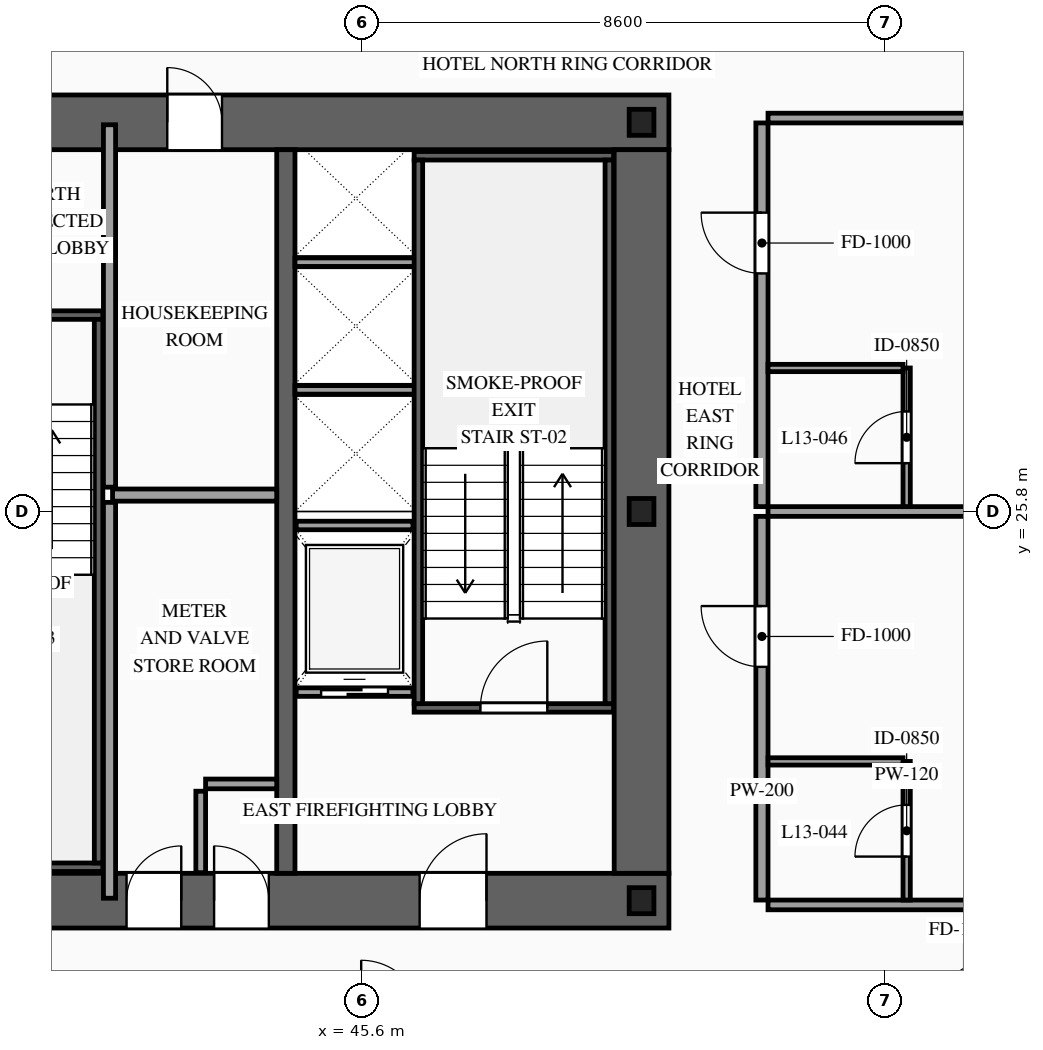
"""IFC4 building model, lengths in metres.
Left out: names, types, materials, properties, quantities, classifications, styles, units other than length and angle.
Written with IfcOpenShell. Run it as: python <this file> out.ifc"""

import sys

from ifc_helpers import new_model, si_unit, direction, frame, frame_2d, origin, origin_2d, place, context, subcontext, project, spatial, rectangle, i_section, extrude, source, transform, mapped, element, fill, save


model = new_model("IFC4")
c1 = context("Model", 3, precision=1e-05, world=origin(), true_north=direction((0.0, 1.0)))
c2 = subcontext(c1, "Body", "Model", "MODEL_VIEW")
j1 = project(units=[si_unit("LENGTHUNIT", "METRE"), si_unit("PLANEANGLEUNIT", "RADIAN")], contexts=[c1])
p1 = place(None, origin())
s1 = spatial("IfcSite", under=j1, at=p1, CompositionType="ELEMENT")
p2 = place(p1, origin())
s2 = spatial("IfcBuilding", under=s1, at=p2, CompositionType="ELEMENT")
p3 = place(p2, frame((0.0, 0.0, 53.2)))
s3 = spatial("IfcBuildingStorey", under=s2, at=p3, CompositionType="ELEMENT", Elevation=53.2)
p4 = place(p3, frame((23.35, 19.4, 0.0), z_axis=(0.0, 0.0, 1.0), x_axis=(1.0, 0.0, 0.0)))
e1 = element("IfcWall", 1, at=p4, inside=s3, PredefinedType="SHEAR", context=c2, shape_type="SweptSolid", body=[
    extrude(rectangle(XDim=27.3, YDim=0.9, at=frame_2d((13.65, 0.0))), origin(), (0.0, 0.0, 1.0), 3.6),
])
p5 = place(p4, frame((2.1, 0.0, 0.0)))
e2 = element("IfcOpeningElement", 2, at=p5, cuts=e1, PredefinedType="OPENING", context=c2, shape_type="SweptSolid", body=[
    extrude(rectangle(XDim=1.1, YDim=2.2, at=frame_2d((0.55, 1.1))), frame((0.0, 0.465, 0.0), z_axis=(0.0, -1.0, 0.0), x_axis=(1.0, 0.0, 0.0)), (0.0, 0.0, 1.0), 0.93),
])
p6 = place(p4, frame((10.0, 0.0, 0.0)))
e3 = element("IfcOpeningElement", 3, at=p6, cuts=e1, PredefinedType="OPENING", context=c2, shape_type="SweptSolid", body=[
    extrude(rectangle(XDim=1.1, YDim=2.2, at=frame_2d((0.55, 1.1))), frame((0.0, 0.465, 0.0), z_axis=(0.0, -1.0, 0.0), x_axis=(1.0, 0.0, 0.0)), (0.0, 0.0, 1.0), 0.93),
])
p7 = place(p4, frame((23.2, 0.0, 0.0)))
e4 = element("IfcOpeningElement", 4, at=p7, cuts=e1, PredefinedType="OPENING", context=c2, shape_type="SweptSolid", body=[
    extrude(rectangle(XDim=1.1, YDim=2.2, at=frame_2d((0.55, 1.1))), frame((0.0, 0.465, 0.0), z_axis=(0.0, -1.0, 0.0), x_axis=(1.0, 0.0, 0.0)), (0.0, 0.0, 1.0), 0.93),
])
p8 = place(p4, frame((19.82, 0.0, 0.0)))
e5 = element("IfcOpeningElement", 5, at=p8, cuts=e1, PredefinedType="OPENING", context=c2, shape_type="SweptSolid", body=[
    extrude(rectangle(XDim=0.9, YDim=2.15, at=frame_2d((0.45, 1.075))), frame((0.0, 0.465, 0.0), z_axis=(0.0, -1.0, 0.0), x_axis=(1.0, 0.0, 0.0)), (0.0, 0.0, 1.0), 0.93),
])
p9 = place(p4, frame((18.38, 0.0, 0.0)))
e6 = element("IfcOpeningElement", 6, at=p9, cuts=e1, PredefinedType="OPENING", context=c2, shape_type="SweptSolid", body=[
    extrude(rectangle(XDim=0.9, YDim=2.15, at=frame_2d((0.45, 1.075))), frame((0.0, 0.465, 0.0), z_axis=(0.0, -1.0, 0.0), x_axis=(1.0, 0.0, 0.0)), (0.0, 0.0, 1.0), 0.93),
])
p10 = place(p3, frame((23.35, 32.2, 0.0), z_axis=(0.0, 0.0, 1.0), x_axis=(1.0, 0.0, 0.0)))
e7 = element("IfcWall", 7, at=p10, inside=s3, PredefinedType="SHEAR", context=c2, shape_type="SweptSolid", body=[
    extrude(rectangle(XDim=27.3, YDim=0.9, at=frame_2d((13.65, 0.0))), origin(), (0.0, 0.0, 1.0), 3.6),
])
p11 = place(p10, frame((4.72, 0.0, 0.0)))
e8 = element("IfcOpeningElement", 8, at=p11, cuts=e7, PredefinedType="OPENING", context=c2, shape_type="SweptSolid", body=[
    extrude(rectangle(XDim=0.9, YDim=2.15, at=frame_2d((0.45, 1.075))), frame((0.0, 0.465, 0.0), z_axis=(0.0, -1.0, 0.0), x_axis=(1.0, 0.0, 0.0)), (0.0, 0.0, 1.0), 0.93),
])
p12 = place(p10, frame((10.0, 0.0, 0.0)))
e9 = element("IfcOpeningElement", 9, at=p12, cuts=e7, PredefinedType="OPENING", context=c2, shape_type="SweptSolid", body=[
    extrude(rectangle(XDim=1.1, YDim=2.2, at=frame_2d((0.55, 1.1))), frame((0.0, 0.465, 0.0), z_axis=(0.0, -1.0, 0.0), x_axis=(1.0, 0.0, 0.0)), (0.0, 0.0, 1.0), 0.93),
])
p13 = place(p10, frame((15.85, 0.0, 0.0)))
e10 = element("IfcOpeningElement", 10, at=p13, cuts=e7, PredefinedType="OPENING", context=c2, shape_type="SweptSolid", body=[
    extrude(rectangle(XDim=1.1, YDim=2.2, at=frame_2d((0.55, 1.1))), frame((0.0, 0.465, 0.0), z_axis=(0.0, -1.0, 0.0), x_axis=(1.0, 0.0, 0.0)), (0.0, 0.0, 1.0), 0.93),
])
p14 = place(p10, frame((19.05, 0.0, 0.0)))
e11 = element("IfcOpeningElement", 11, at=p14, cuts=e7, PredefinedType="OPENING", context=c2, shape_type="SweptSolid", body=[
    extrude(rectangle(XDim=0.9, YDim=2.15, at=frame_2d((0.45, 1.075))), frame((0.0, 0.465, 0.0), z_axis=(0.0, -1.0, 0.0), x_axis=(1.0, 0.0, 0.0)), (0.0, 0.0, 1.0), 0.93),
])
m1 = source(origin(), c2, "Body", "SweptSolid", [
    extrude(rectangle(XDim=11.9, YDim=0.9, at=frame_2d((5.95, 0.0))), origin(), (0.0, 0.0, 1.0), 3.6),
])
p15 = place(p3, frame((50.2, 19.85, 0.0), z_axis=(0.0, 0.0, 1.0), x_axis=(0.0, 1.0, 0.0)))
e12 = element("IfcWall", 12, at=p15, inside=s3, PredefinedType="SHEAR", context=c2, shape_type="MappedRepresentation", body=[
    mapped(m1, transform((0.0, 0.0, 0.0), scale=1.0)),
])
m2 = source(origin(), c2, "Body", "SweptSolid", [
    extrude(rectangle(XDim=11.9, YDim=0.3, at=frame_2d((5.95, 0.0))), origin(), (0.0, 0.0, 1.0), 3.6),
])
p16 = place(p3, frame((44.35, 19.85, 0.0), z_axis=(0.0, 0.0, 1.0), x_axis=(0.0, 1.0, 0.0)))
e13 = element("IfcWall", 13, at=p16, inside=s3, PredefinedType="SOLIDWALL", context=c2, shape_type="MappedRepresentation", body=[
    mapped(m2, transform((0.0, 0.0, 0.0), scale=1.0)),
])
m3 = source(origin(), c2, "Body", "SweptSolid", [
    extrude(i_section(OverallWidth=0.407, OverallDepth=0.428, WebThickness=0.02, FlangeThickness=0.035, at=origin_2d()), origin(), (0.0, 0.0, 1.0), 3.6),
])
for number, where, z_axis, x_axis in (
    (14, (50.2, 19.4, 0.0), (0.0, 0.0, 1.0), (1.0, 0.0, 0.0)),
    (15, (50.2, 25.8, 0.0), (0.0, 0.0, 1.0), (1.0, 0.0, 0.0)),
    (16, (50.2, 32.2, 0.0), (0.0, 0.0, 1.0), (1.0, 0.0, 0.0)),
):
    element("IfcColumn", number, at=place(p3, frame(where, z_axis=z_axis, x_axis=x_axis)), inside=s3, PredefinedType="COLUMN", context=c2, shape_type="MappedRepresentation", body=[
        mapped(m3, transform((0.0, 0.0, 0.0), scale=1.0)),
    ])
p17 = place(p3, frame((44.52, 22.83, 0.0), z_axis=(0.0, 0.0, 1.0), x_axis=(1.0, 0.0, 0.0)))
e17 = element("IfcWall", 17, at=p17, inside=s3, PredefinedType="SOLIDWALL", context=c2, shape_type="SweptSolid", body=[
    extrude(rectangle(XDim=1.92, YDim=0.14, at=frame_2d((0.96, 0.0))), origin(), (0.0, 0.0, 1.0), 3.38),
])
p18 = place(p17, frame((0.41, 0.0, 0.0)))
e18 = element("IfcOpeningElement", 18, at=p18, cuts=e17, PredefinedType="OPENING", context=c2, shape_type="SweptSolid", body=[
    extrude(rectangle(XDim=1.1, YDim=2.2, at=frame_2d((0.55, 1.1))), frame((0.0, 0.085, 0.0), z_axis=(0.0, -1.0, 0.0), x_axis=(1.0, 0.0, 0.0)), (0.0, 0.0, 1.0), 0.17),
])
m4 = source(origin(), c2, "Body", "SweptSolid", [
    extrude(rectangle(XDim=1.92, YDim=0.14, at=frame_2d((0.96, 0.0))), origin(), (0.0, 0.0, 1.0), 3.38),
])
p19 = place(p3, frame((44.52, 25.57, 0.0), z_axis=(0.0, 0.0, 1.0), x_axis=(1.0, 0.0, 0.0)))
e19 = element("IfcWall", 19, at=p19, inside=s3, PredefinedType="SOLIDWALL", context=c2, shape_type="MappedRepresentation", body=[
    mapped(m4, transform((0.0, 0.0, 0.0), scale=1.0)),
])
m5 = source(origin(), c2, "Body", "SweptSolid", [
    extrude(rectangle(XDim=2.0, YDim=0.14, at=frame_2d((1.0, 0.0))), origin(), (0.0, 0.0, 1.0), 3.38),
])
for number, where, z_axis, x_axis in (
    (20, (44.5, 27.8, 0.0), (0.0, 0.0, 1.0), (1.0, 0.0, 0.0)),
    (21, (44.5, 29.9, 0.0), (0.0, 0.0, 1.0), (1.0, 0.0, 0.0)),
):
    element("IfcWall", number, at=place(p3, frame(where, z_axis=z_axis, x_axis=x_axis)), inside=s3, PredefinedType="SOLIDWALL", context=c2, shape_type="MappedRepresentation", body=[
        mapped(m5, transform((0.0, 0.0, 0.0), scale=1.0)),
    ])
p20 = place(p3, frame((46.46, 22.57, 0.0), z_axis=(0.0, 0.0, 1.0), x_axis=(1.0, 0.0, 0.0)))
e22 = element("IfcWall", 22, at=p20, inside=s3, PredefinedType="SOLIDWALL", context=c2, shape_type="SweptSolid", body=[
    extrude(rectangle(XDim=3.28, YDim=0.14, at=frame_2d((1.64, 0.0))), origin(), (0.0, 0.0, 1.0), 3.38),
])
p21 = place(p20, frame((1.09, 0.0, 0.0)))
e23 = element("IfcOpeningElement", 23, at=p21, cuts=e22, PredefinedType="OPENING", context=c2, shape_type="SweptSolid", body=[
    extrude(rectangle(XDim=1.1, YDim=2.2, at=frame_2d((0.55, 1.1))), frame((0.0, 0.085, 0.0), z_axis=(0.0, -1.0, 0.0), x_axis=(1.0, 0.0, 0.0)), (0.0, 0.0, 1.0), 0.17),
])
m6 = source(origin(), c2, "Body", "SweptSolid", [
    extrude(rectangle(XDim=3.28, YDim=0.14, at=frame_2d((1.64, 0.0))), origin(), (0.0, 0.0, 1.0), 3.38),
])
p22 = place(p3, frame((46.46, 31.65, 0.0), z_axis=(0.0, 0.0, 1.0), x_axis=(1.0, 0.0, 0.0)))
e24 = element("IfcWall", 24, at=p22, inside=s3, PredefinedType="SOLIDWALL", context=c2, shape_type="MappedRepresentation", body=[
    mapped(m6, transform((0.0, 0.0, 0.0), scale=1.0)),
])
m7 = source(origin(), c2, "Body", "SweptSolid", [
    extrude(rectangle(XDim=8.94, YDim=0.14, at=frame_2d((4.47, 0.0))), origin(), (0.0, 0.0, 1.0), 3.38),
])
for number, where, z_axis, x_axis in (
    (25, (46.53, 22.64, 0.0), (0.0, 0.0, 1.0), (0.0, 1.0, 0.0)),
    (26, (49.67, 22.64, 0.0), (0.0, 0.0, 1.0), (0.0, 1.0, 0.0)),
):
    element("IfcWall", number, at=place(p3, frame(where, z_axis=z_axis, x_axis=x_axis)), inside=s3, PredefinedType="SOLIDWALL", context=c2, shape_type="MappedRepresentation", body=[
        mapped(m7, transform((0.0, 0.0, 0.0), scale=1.0)),
    ])
p23 = place(p3, frame((38.2, 29.03, 0.0), z_axis=(0.0, 0.0, 1.0), x_axis=(1.0, 0.0, 0.0)))
e27 = element("IfcWall", 27, at=p23, inside=s3, PredefinedType="SOLIDWALL", context=c2, shape_type="SweptSolid", body=[
    extrude(rectangle(XDim=3.14, YDim=0.14, at=frame_2d((1.57, 0.0))), origin(), (0.0, 0.0, 1.0), 3.38),
])
p24 = place(p23, frame((1.02, 0.0, 0.0)))
e28 = element("IfcOpeningElement", 28, at=p24, cuts=e27, PredefinedType="OPENING", context=c2, shape_type="SweptSolid", body=[
    extrude(rectangle(XDim=1.1, YDim=2.2, at=frame_2d((0.55, 1.1))), frame((0.0, 0.085, 0.0), z_axis=(0.0, -1.0, 0.0), x_axis=(1.0, 0.0, 0.0)), (0.0, 0.0, 1.0), 0.17),
])
m8 = source(origin(), c2, "Body", "SweptSolid", [
    extrude(rectangle(XDim=3.14, YDim=0.14, at=frame_2d((1.57, 0.0))), origin(), (0.0, 0.0, 1.0), 3.38),
])
p25 = place(p3, frame((38.2, 19.95, 0.0), z_axis=(0.0, 0.0, 1.0), x_axis=(1.0, 0.0, 0.0)))
e29 = element("IfcWall", 29, at=p25, inside=s3, PredefinedType="SOLIDWALL", context=c2, shape_type="MappedRepresentation", body=[
    mapped(m8, transform((0.0, 0.0, 0.0), scale=1.0)),
])
m9 = source(origin(), c2, "Body", "SweptSolid", [
    extrude(rectangle(XDim=8.94, YDim=0.14, at=frame_2d((4.47, 0.0))), origin(), (0.0, 0.0, 1.0), 3.38),
])
p26 = place(p3, frame((41.27, 20.02, 0.0), z_axis=(0.0, 0.0, 1.0), x_axis=(0.0, 1.0, 0.0)))
e30 = element("IfcWall", 30, at=p26, inside=s3, PredefinedType="SOLIDWALL", context=c2, shape_type="MappedRepresentation", body=[
    mapped(m9, transform((0.0, 0.0, 0.0), scale=1.0)),
])
m10 = source(origin(), c2, "Body", "SweptSolid", [
    extrude(rectangle(XDim=1.34, YDim=0.16, at=frame_2d((0.67, 0.0))), origin(), (0.0, 0.0, 1.0), 3.38),
])
p27 = place(p3, frame((42.95, 19.86, 0.0), z_axis=(0.0, 0.0, 1.0), x_axis=(0.0, 1.0, 0.0)))
e31 = element("IfcWall", 31, at=p27, inside=s3, PredefinedType="PARTITIONING", context=c2, shape_type="MappedRepresentation", body=[
    mapped(m10, transform((0.0, 0.0, 0.0), scale=1.0)),
])
m11 = source(origin(), c2, "Body", "SweptSolid", [
    extrude(rectangle(XDim=1.17, YDim=0.16, at=frame_2d((0.585, 0.0))), origin(), (0.0, 0.0, 1.0), 3.38),
])
p28 = place(p3, frame((43.03, 21.32, 0.0), z_axis=(0.0, 0.0, 1.0), x_axis=(1.0, 0.0, 0.0)))
e32 = element("IfcWall", 32, at=p28, inside=s3, PredefinedType="PARTITIONING", context=c2, shape_type="MappedRepresentation", body=[
    mapped(m11, transform((0.0, 0.0, 0.0), scale=1.0)),
])
m12 = source(origin(), c2, "Body", "SweptSolid", [
    extrude(rectangle(XDim=6.51, YDim=0.2, at=frame_2d((3.255, 0.0))), origin(), (0.0, 0.0, 1.0), 3.38),
])
p29 = place(p3, frame((41.45, 19.44, 0.0), z_axis=(0.0, 0.0, 1.0), x_axis=(0.0, 1.0, 0.0)))
e33 = element("IfcWall", 33, at=p29, inside=s3, PredefinedType="PARTITIONING", context=c2, shape_type="MappedRepresentation", body=[
    mapped(m12, transform((0.0, 0.0, 0.0), scale=1.0)),
])
m13 = source(origin(), c2, "Body", "SweptSolid", [
    extrude(rectangle(XDim=2.7, YDim=0.2, at=frame_2d((1.35, 0.0))), origin(), (0.0, 0.0, 1.0), 3.38),
])
p30 = place(p3, frame((41.5, 26.07, 0.0), z_axis=(0.0, 0.0, 1.0), x_axis=(1.0, 0.0, 0.0)))
e34 = element("IfcWall", 34, at=p30, inside=s3, PredefinedType="PARTITIONING", context=c2, shape_type="MappedRepresentation", body=[
    mapped(m13, transform((0.0, 0.0, 0.0), scale=1.0)),
])
m14 = source(origin(), c2, "Body", "SweptSolid", [
    extrude(rectangle(XDim=5.96, YDim=0.2, at=frame_2d((2.98, 0.0))), origin(), (0.0, 0.0, 1.0), 3.38),
])
p31 = place(p3, frame((41.45, 26.2, 0.0), z_axis=(0.0, 0.0, 1.0), x_axis=(0.0, 1.0, 0.0)))
e35 = element("IfcWall", 35, at=p31, inside=s3, PredefinedType="PARTITIONING", context=c2, shape_type="MappedRepresentation", body=[
    mapped(m14, transform((0.0, 0.0, 0.0), scale=1.0)),
])
p32 = place(p3, frame((52.18, 19.41, 0.0), z_axis=(0.0, 0.0, 1.0), x_axis=(0.0, 1.0, 0.0)))
e36 = element("IfcWall", 36, at=p32, inside=s3, PredefinedType="PARTITIONING", context=c2, shape_type="SweptSolid", body=[
    extrude(rectangle(XDim=6.31, YDim=0.2, at=frame_2d((3.155, 0.0))), origin(), (0.0, 0.0, 1.0), 3.38),
])
p33 = place(p32, frame((3.835, 0.0, 0.0)))
e37 = element("IfcOpeningElement", 37, at=p33, cuts=e36, PredefinedType="OPENING", context=c2, shape_type="SweptSolid", body=[
    extrude(rectangle(XDim=1.0, YDim=2.2, at=frame_2d((0.5, 1.1))), frame((0.0, 0.115, 0.0), z_axis=(0.0, -1.0, 0.0), x_axis=(1.0, 0.0, 0.0)), (0.0, 0.0, 1.0), 0.23),
])
m15 = source(origin(), c2, "Body", "SweptSolid", [
    extrude(rectangle(XDim=9.67, YDim=0.16, at=frame_2d((4.835, 0.0))), origin(), (0.0, 0.0, 1.0), 2.575),
])
p34 = place(p3, frame((52.28, 25.8, 0.0), z_axis=(0.0, 0.0, 1.0), x_axis=(1.0, 0.0, 0.0)))
e38 = element("IfcWall", 38, at=p34, inside=s3, PredefinedType="PARTITIONING", context=c2, shape_type="MappedRepresentation", body=[
    mapped(m15, transform((0.0, 0.0, 0.0), scale=1.0)),
])
m16 = source(origin(), c2, "Body", "SweptSolid", [
    extrude(rectangle(XDim=9.67, YDim=0.16, at=frame_2d((4.835, 0.0))), origin(), (0.0, 0.0, 1.0), 2.875),
])
p35 = place(p3, frame((52.28, 19.33, 0.0), z_axis=(0.0, 0.0, 1.0), x_axis=(1.0, 0.0, 0.0)))
e39 = element("IfcWall", 39, at=p35, inside=s3, PredefinedType="PARTITIONING", context=c2, shape_type="MappedRepresentation", body=[
    mapped(m16, transform((0.0, 0.0, 0.0), scale=1.0)),
])
p36 = place(p3, frame((54.56, 19.41, 0.0), z_axis=(0.0, 0.0, 1.0), x_axis=(0.0, 1.0, 0.0)))
e40 = element("IfcWall", 40, at=p36, inside=s3, PredefinedType="PARTITIONING", context=c2, shape_type="SweptSolid", body=[
    extrude(rectangle(XDim=2.28, YDim=0.12, at=frame_2d((1.14, 0.0))), origin(), (0.0, 0.0, 1.0), 3.38),
])
p37 = place(p36, frame((0.715, 0.0, 0.0)))
e41 = element("IfcOpeningElement", 41, at=p37, cuts=e40, PredefinedType="OPENING", context=c2, shape_type="SweptSolid", body=[
    extrude(rectangle(XDim=0.85, YDim=2.1, at=frame_2d((0.425, 1.05))), frame((0.0, 0.075, 0.0), z_axis=(0.0, -1.0, 0.0), x_axis=(1.0, 0.0, 0.0)), (0.0, 0.0, 1.0), 0.15),
])
m17 = source(origin(), c2, "Body", "SweptSolid", [
    extrude(rectangle(XDim=2.22, YDim=0.12, at=frame_2d((1.11, 0.0))), origin(), (0.0, 0.0, 1.0), 3.38),
])
p38 = place(p3, frame((52.28, 21.69, 0.0), z_axis=(0.0, 0.0, 1.0), x_axis=(1.0, 0.0, 0.0)))
e42 = element("IfcWall", 42, at=p38, inside=s3, PredefinedType="PARTITIONING", context=c2, shape_type="MappedRepresentation", body=[
    mapped(m17, transform((0.0, 0.0, 0.0), scale=1.0)),
])
p39 = place(p3, frame((52.18, 25.88, 0.0), z_axis=(0.0, 0.0, 1.0), x_axis=(0.0, 1.0, 0.0)))
e43 = element("IfcWall", 43, at=p39, inside=s3, PredefinedType="PARTITIONING", context=c2, shape_type="SweptSolid", body=[
    extrude(rectangle(XDim=6.31, YDim=0.2, at=frame_2d((3.155, 0.0))), origin(), (0.0, 0.0, 1.0), 3.38),
])
p40 = place(p39, frame((3.835, 0.0, 0.0)))
e44 = element("IfcOpeningElement", 44, at=p40, cuts=e43, PredefinedType="OPENING", context=c2, shape_type="SweptSolid", body=[
    extrude(rectangle(XDim=1.0, YDim=2.2, at=frame_2d((0.5, 1.1))), frame((0.0, 0.115, 0.0), z_axis=(0.0, -1.0, 0.0), x_axis=(1.0, 0.0, 0.0)), (0.0, 0.0, 1.0), 0.23),
])
p41 = place(p3, frame((52.28, 32.27, 0.0), z_axis=(0.0, 0.0, 1.0), x_axis=(1.0, 0.0, 0.0)))
e45 = element("IfcWall", 45, at=p41, inside=s3, PredefinedType="PARTITIONING", context=c2, shape_type="MappedRepresentation", body=[
    mapped(m16, transform((0.0, 0.0, 0.0), scale=1.0)),
])
p42 = place(p3, frame((54.56, 25.88, 0.0), z_axis=(0.0, 0.0, 1.0), x_axis=(0.0, 1.0, 0.0)))
e46 = element("IfcWall", 46, at=p42, inside=s3, PredefinedType="PARTITIONING", context=c2, shape_type="SweptSolid", body=[
    extrude(rectangle(XDim=2.28, YDim=0.12, at=frame_2d((1.14, 0.0))), origin(), (0.0, 0.0, 1.0), 3.38),
])
p43 = place(p42, frame((0.715, 0.0, 0.0)))
e47 = element("IfcOpeningElement", 47, at=p43, cuts=e46, PredefinedType="OPENING", context=c2, shape_type="SweptSolid", body=[
    extrude(rectangle(XDim=0.85, YDim=2.1, at=frame_2d((0.425, 1.05))), frame((0.0, 0.075, 0.0), z_axis=(0.0, -1.0, 0.0), x_axis=(1.0, 0.0, 0.0)), (0.0, 0.0, 1.0), 0.15),
])
p44 = place(p3, frame((52.28, 28.16, 0.0), z_axis=(0.0, 0.0, 1.0), x_axis=(1.0, 0.0, 0.0)))
e48 = element("IfcWall", 48, at=p44, inside=s3, PredefinedType="PARTITIONING", context=c2, shape_type="MappedRepresentation", body=[
    mapped(m17, transform((0.0, 0.0, 0.0), scale=1.0)),
])
m18 = source(origin(), c2, "Body", "SweptSolid", [
    extrude(rectangle(XDim=1.1, YDim=2.2, at=frame_2d((0.55, 1.1))), frame((0.0, 0.025, 0.0), z_axis=(0.0, -1.0, 0.0), x_axis=(1.0, 0.0, 0.0)), (0.0, 0.0, 1.0), 0.05),
])
p45 = place(p18, origin())
e49 = element("IfcDoor", 49, at=p45, inside=s3, OperationType="SLIDING_TO_RIGHT", PredefinedType="DOOR", context=c2, shape_type="MappedRepresentation", body=[
    mapped(m18, transform((0.0, 0.0, 0.0), scale=1.0)),
])
fill(e18, e49)
m19 = source(origin(), c2, "Body", "SweptSolid", [
    extrude(rectangle(XDim=1.1, YDim=2.2, at=frame_2d((0.55, 1.1))), frame((0.0, 0.025, 0.0), z_axis=(0.0, -1.0, 0.0), x_axis=(1.0, 0.0, 0.0)), (0.0, 0.0, 1.0), 0.05),
])
p46 = place(p21, origin())
e50 = element("IfcDoor", 50, at=p46, inside=s3, OperationType="SINGLE_SWING_RIGHT", PredefinedType="DOOR", context=c2, shape_type="MappedRepresentation", body=[
    mapped(m19, transform((0.0, 0.0, 0.0), scale=1.0)),
])
fill(e23, e50)
p47 = place(p7, origin())
e51 = element("IfcDoor", 51, at=p47, inside=s3, OperationType="SINGLE_SWING_RIGHT", PredefinedType="DOOR", context=c2, shape_type="MappedRepresentation", body=[
    mapped(m19, transform((0.0, 0.0, 0.0), scale=1.0)),
])
fill(e4, e51)
m20 = source(origin(), c2, "Body", "SweptSolid", [
    extrude(rectangle(XDim=0.9, YDim=2.15, at=frame_2d((0.45, 1.075))), frame((0.0, 0.025, 0.0), z_axis=(0.0, -1.0, 0.0), x_axis=(1.0, 0.0, 0.0)), (0.0, 0.0, 1.0), 0.05),
])
p48 = place(p8, origin())
e52 = element("IfcDoor", 52, at=p48, inside=s3, OperationType="SINGLE_SWING_LEFT", PredefinedType="DOOR", context=c2, shape_type="MappedRepresentation", body=[
    mapped(m20, transform((0.0, 0.0, 0.0), scale=1.0)),
])
fill(e5, e52)
p49 = place(p9, origin())
e53 = element("IfcDoor", 53, at=p49, inside=s3, OperationType="SINGLE_SWING_RIGHT", PredefinedType="DOOR", context=c2, shape_type="MappedRepresentation", body=[
    mapped(m20, transform((0.0, 0.0, 0.0), scale=1.0)),
])
fill(e6, e53)
p50 = place(p14, origin())
e54 = element("IfcDoor", 54, at=p50, inside=s3, OperationType="SINGLE_SWING_LEFT", PredefinedType="DOOR", context=c2, shape_type="MappedRepresentation", body=[
    mapped(m20, transform((0.0, 0.0, 0.0), scale=1.0)),
])
fill(e11, e54)
m21 = source(origin(), c2, "Body", "SweptSolid", [
    extrude(rectangle(XDim=1.0, YDim=2.2, at=frame_2d((0.5, 1.1))), frame((0.0, 0.025, 0.0), z_axis=(0.0, -1.0, 0.0), x_axis=(1.0, 0.0, 0.0)), (0.0, 0.0, 1.0), 0.05),
])
p51 = place(p33, origin())
e55 = element("IfcDoor", 55, at=p51, inside=s3, OperationType="SINGLE_SWING_RIGHT", PredefinedType="DOOR", context=c2, shape_type="MappedRepresentation", body=[
    mapped(m21, transform((0.0, 0.0, 0.0), scale=1.0)),
])
fill(e37, e55)
m22 = source(origin(), c2, "Body", "SweptSolid", [
    extrude(rectangle(XDim=0.85, YDim=2.1, at=frame_2d((0.425, 1.05))), frame((0.0, 0.025, 0.0), z_axis=(0.0, -1.0, 0.0), x_axis=(1.0, 0.0, 0.0)), (0.0, 0.0, 1.0), 0.05),
])
p52 = place(p37, origin())
e56 = element("IfcDoor", 56, at=p52, inside=s3, OperationType="SINGLE_SWING_LEFT", PredefinedType="DOOR", context=c2, shape_type="MappedRepresentation", body=[
    mapped(m22, transform((0.0, 0.0, 0.0), scale=1.0)),
])
fill(e41, e56)
p53 = place(p40, origin())
e57 = element("IfcDoor", 57, at=p53, inside=s3, OperationType="SINGLE_SWING_RIGHT", PredefinedType="DOOR", context=c2, shape_type="MappedRepresentation", body=[
    mapped(m21, transform((0.0, 0.0, 0.0), scale=1.0)),
])
fill(e44, e57)
p54 = place(p43, origin())
e58 = element("IfcDoor", 58, at=p54, inside=s3, OperationType="SINGLE_SWING_LEFT", PredefinedType="DOOR", context=c2, shape_type="MappedRepresentation", body=[
    mapped(m22, transform((0.0, 0.0, 0.0), scale=1.0)),
])
fill(e47, e58)
save(model, sys.argv[1])
